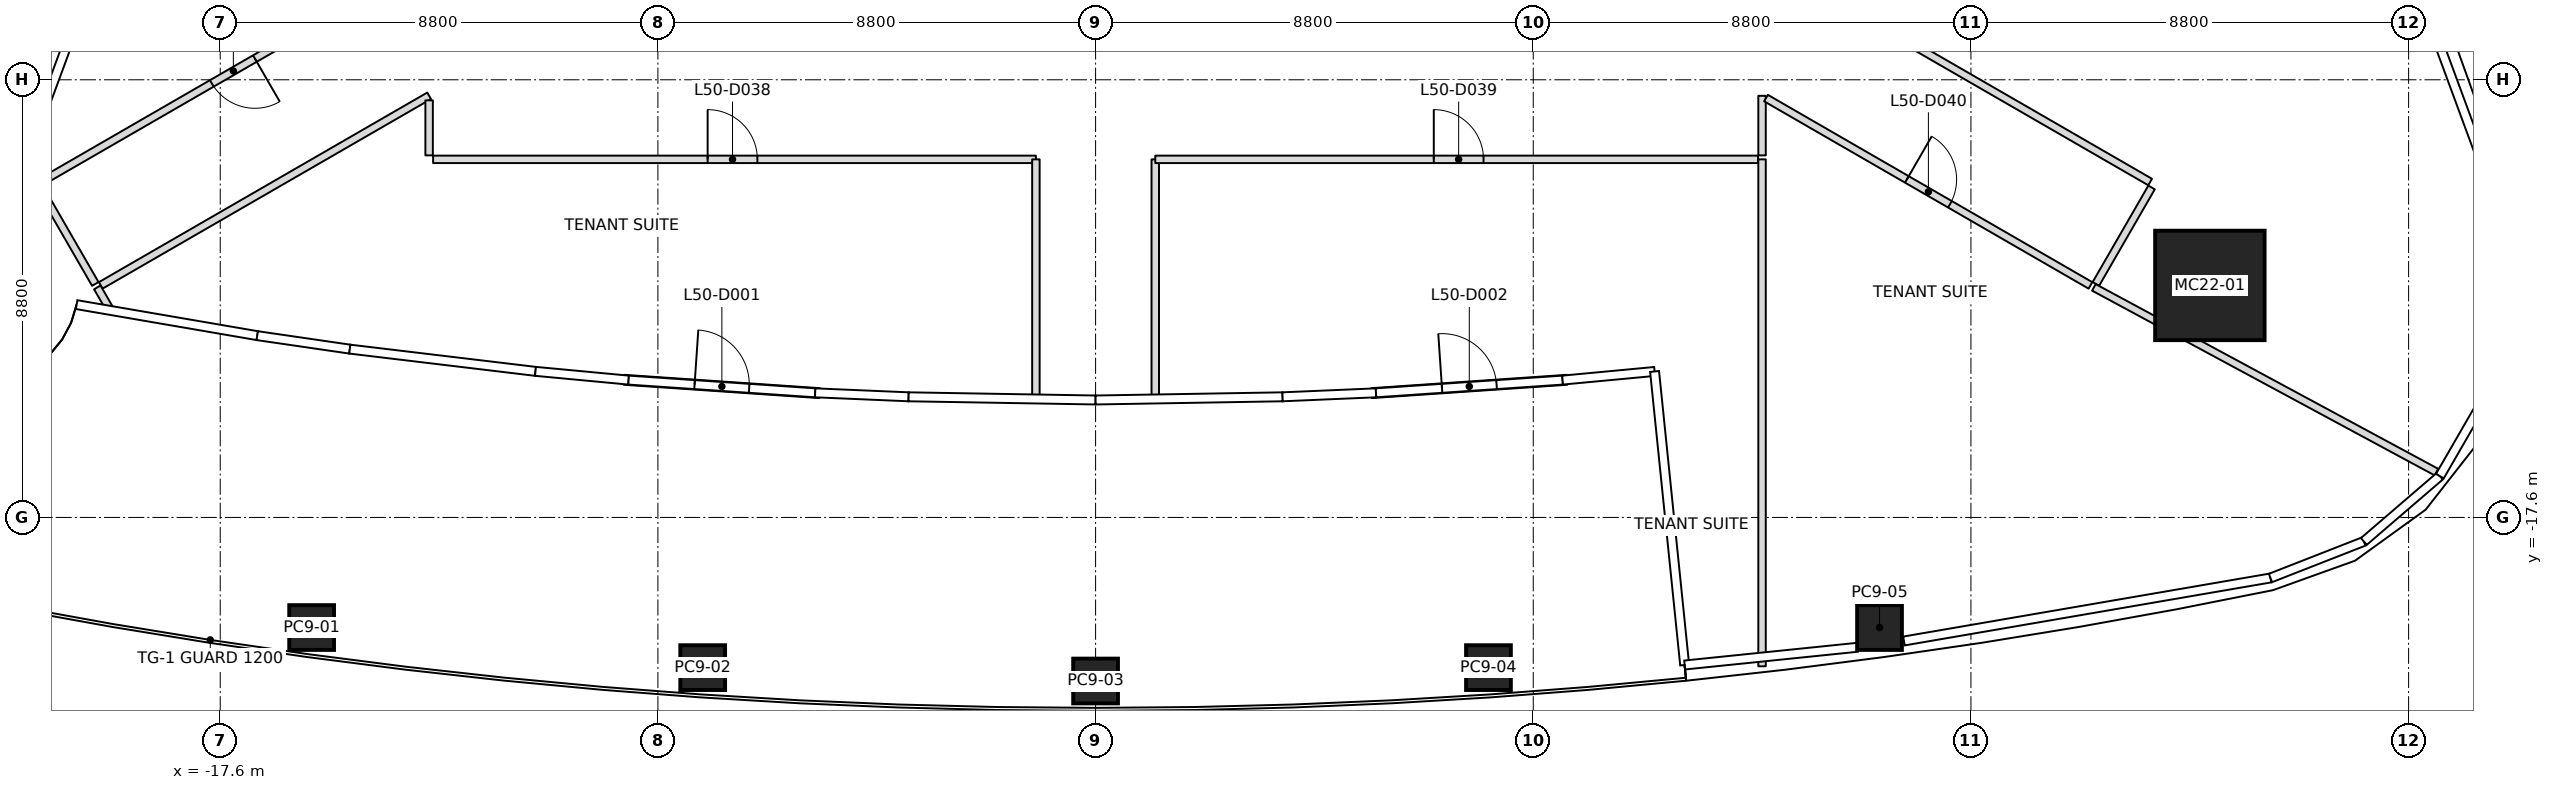
"""IFC4 building model, lengths in metres.
Left out: names, types, materials, properties, quantities, classifications, styles, units other than length and angle.
Written with IfcOpenShell. Run it as: python <this file> out.ifc"""

import sys

from ifc_helpers import new_model, si_unit, direction, frame, frame_2d, origin, origin_2d, place, context, subcontext, project, spatial, rectangle, extrude, clip, halfspace, element, fill, save


model = new_model("IFC4")
c1 = context("Model", 3, precision=1e-05, world=origin(), true_north=direction((0.0, 1.0)))
c2 = subcontext(c1, "Body", "Model", "MODEL_VIEW")
j1 = project(units=[si_unit("LENGTHUNIT", "METRE"), si_unit("PLANEANGLEUNIT", "RADIAN")], contexts=[c1])
p1 = place(None, origin())
s1 = spatial("IfcSite", under=j1, at=p1, CompositionType="ELEMENT")
p2 = place(p1, origin())
s2 = spatial("IfcBuilding", under=s1, at=p2, CompositionType="ELEMENT")
p3 = place(p2, frame((0.0, 0.0, 227.0)))
s3 = spatial("IfcBuildingStorey", under=s2, at=p3, CompositionType="ELEMENT", Elevation=227.0)
p4 = place(p3, frame((22.404, -12.935, 0.0), z_axis=(-0.027878605886, 0.016104927689, 0.999481572936), x_axis=(0.999611316129, 0.000449157512, 0.02787498742)))
e1 = element("IfcColumn", 1, at=p4, inside=s3, PredefinedType="COLUMN", context=c2, shape_type="SweptSolid", body=[
    clip(extrude(rectangle(XDim=2.2, YDim=2.2, at=origin_2d()), origin(), (0.0, 0.0, 1.0), 4.002), halfspace(frame((0.0, 0.0, 0.011)), True)),
])
p5 = place(p3, frame((-15.762, -19.814, 0.0), z_axis=(0.017574453011, 0.010434831475, 0.999791104628), x_axis=(-0.990587246612, 0.135945228189, 0.015993804505)))
e2 = element("IfcColumn", 2, at=p5, inside=s3, PredefinedType="COLUMN", context=c2, shape_type="SweptSolid", body=[
    clip(extrude(rectangle(XDim=0.9, YDim=0.9, at=origin_2d()), origin(), (0.0, 0.0, 1.0), 4.001), halfspace(frame((0.0, 0.0, 0.003)), True)),
])
p6 = place(p3, frame((-7.899, -20.619, 0.0), z_axis=(0.008788174922, 0.01116830563, 0.999899013366), x_axis=(-0.997643851846, 0.068136832565, 0.00800730434)))
e3 = element("IfcColumn", 3, at=p6, inside=s3, PredefinedType="COLUMN", context=c2, shape_type="SweptSolid", body=[
    clip(extrude(rectangle(XDim=0.9, YDim=0.9, at=origin_2d()), origin(), (0.0, 0.0, 1.0), 4.0), halfspace(frame((0.0, 0.0, 0.002)), True)),
])
p7 = place(p3, frame((0.0, -20.889, 0.0), z_axis=(0.0, 0.01141283087, 0.999934871525), x_axis=(1.0, 0.0, 0.0)))
e4 = element("IfcColumn", 4, at=p7, inside=s3, PredefinedType="COLUMN", context=c2, shape_type="SweptSolid", body=[
    clip(extrude(rectangle(XDim=0.9, YDim=0.9, at=origin_2d()), origin(), (0.0, 0.0, 1.0), 4.0), halfspace(frame((0.0, 0.0, 0.001)), True)),
])
p8 = place(p3, frame((7.899, -20.619, 0.0), z_axis=(-0.008788174922, 0.01116830563, 0.999899013366), x_axis=(0.997643851846, 0.068136832565, 0.00800730434)))
e5 = element("IfcColumn", 5, at=p8, inside=s3, PredefinedType="COLUMN", context=c2, shape_type="SweptSolid", body=[
    clip(extrude(rectangle(XDim=0.9, YDim=0.9, at=origin_2d()), origin(), (0.0, 0.0, 1.0), 4.0), halfspace(frame((0.0, 0.0, 0.002)), True)),
])
p9 = place(p3, frame((15.762, -19.814, 0.0), z_axis=(-0.017574453011, 0.010434831475, 0.999791104628), x_axis=(0.990587246612, 0.135945228189, 0.015993804505)))
e6 = element("IfcColumn", 6, at=p9, inside=s3, PredefinedType="COLUMN", context=c2, shape_type="SweptSolid", body=[
    clip(extrude(rectangle(XDim=0.9, YDim=0.9, at=origin_2d()), origin(), (0.0, 0.0, 1.0), 4.001), halfspace(frame((0.0, 0.0, 0.003)), True)),
])
p10 = place(p3, frame((-9.479, -14.832, 0.0), z_axis=(0.0, 0.0, 1.0), x_axis=(0.997678624497, -0.068098180754, 0.0)))
e7 = element("IfcWall", 7, at=p10, inside=s3, PredefinedType="SOLIDWALL", context=c2, shape_type="SweptSolid", body=[
    extrude(rectangle(XDim=3.94, YDim=0.2, at=frame_2d((1.97, 0.0))), origin(), (0.0, 0.0, 1.0), 3.34),
])
p11 = place(p10, frame((1.42, 0.0, 0.0)))
e8 = element("IfcOpeningElement", 8, at=p11, cuts=e7, PredefinedType="OPENING", context=c2, shape_type="SweptSolid", body=[
    extrude(rectangle(XDim=1.1, YDim=2.1, at=frame_2d((0.55, 1.05))), frame((0.0, 0.1, 0.0), z_axis=(0.0, -1.0, 0.0), x_axis=(1.0, 0.0, 0.0)), (0.0, 0.0, 1.0), 0.2),
])
p12 = place(p3, frame((5.548, -15.101, 0.0), z_axis=(0.0, 0.0, 1.0), x_axis=(0.997678624497, 0.068098180754, 0.0)))
e9 = element("IfcWall", 9, at=p12, inside=s3, PredefinedType="SOLIDWALL", context=c2, shape_type="SweptSolid", body=[
    extrude(rectangle(XDim=3.94, YDim=0.2, at=frame_2d((1.97, 0.0))), origin(), (0.0, 0.0, 1.0), 3.34),
])
p13 = place(p12, frame((1.42, 0.0, 0.0)))
e10 = element("IfcOpeningElement", 10, at=p13, cuts=e9, PredefinedType="OPENING", context=c2, shape_type="SweptSolid", body=[
    extrude(rectangle(XDim=1.1, YDim=2.1, at=frame_2d((0.55, 1.05))), frame((0.0, 0.1, 0.0), z_axis=(0.0, -1.0, 0.0), x_axis=(1.0, 0.0, 0.0)), (0.0, 0.0, 1.0), 0.2),
])
p14 = place(p3, frame((-20.072, -12.974, 0.0), z_axis=(0.0, 0.0, 1.0), x_axis=(0.499761325023, -0.866163159002, 0.0)))
e11 = element("IfcWall", 11, at=p14, inside=s3, PredefinedType="PARTITIONING", context=c2, shape_type="SweptSolid", body=[
    extrude(rectangle(XDim=0.544, YDim=0.15, at=frame_2d((0.272, 0.0))), origin(), (0.0, 0.0, 1.0), 3.45),
])
p15 = place(p3, frame((13.4, -10.4, 0.0), z_axis=(0.0, 0.0, 1.0), x_axis=(0.0, -1.0, 0.0)))
e12 = element("IfcWall", 12, at=p15, inside=s3, PredefinedType="PARTITIONING", context=c2, shape_type="SweptSolid", body=[
    extrude(rectangle(XDim=10.193, YDim=0.15, at=frame_2d((5.096, 0.0))), origin(), (0.0, 0.0, 1.0), 3.234),
])
p16 = place(p3, frame((20.072, -12.974, 0.0), z_axis=(0.0, 0.0, 1.0), x_axis=(0.880159358653, -0.474678315678, 0.0)))
e13 = element("IfcWall", 13, at=p16, inside=s3, PredefinedType="PARTITIONING", context=c2, shape_type="SweptSolid", body=[
    extrude(rectangle(XDim=7.825, YDim=0.15, at=frame_2d((3.913, 0.0))), origin(), (0.0, 0.0, 1.0), 3.234),
])
p17 = place(p3, frame((-21.232, -10.965, 0.0), z_axis=(0.0, 0.0, 1.0), x_axis=(0.49994888933, -0.866054910533, 0.0)))
e14 = element("IfcWall", 14, at=p17, inside=s3, PredefinedType="PARTITIONING", context=c2, shape_type="SweptSolid", body=[
    extrude(rectangle(XDim=2.24, YDim=0.15, at=frame_2d((1.12, 0.0))), origin(), (0.0, 0.0, 1.0), 3.233),
])
p18 = place(p3, frame((-13.4, -6.351, 0.0), z_axis=(0.0, 0.0, 1.0), x_axis=(-0.866033522472, -0.499985937757, 0.0)))
e15 = element("IfcWall", 15, at=p18, inside=s3, PredefinedType="PARTITIONING", context=c2, shape_type="SweptSolid", body=[
    extrude(rectangle(XDim=9.01, YDim=0.15, at=frame_2d((4.505, 0.0))), origin(), (0.0, 0.0, 1.0), 3.317),
])
p19 = place(p18, frame((4.045, 0.0, 0.0)))
e16 = element("IfcOpeningElement", 16, at=p19, cuts=e15, PredefinedType="OPENING", context=c2, shape_type="SweptSolid", body=[
    extrude(rectangle(XDim=1.0, YDim=2.1, at=frame_2d((0.5, 1.05))), frame((0.0, 0.075, 0.0), z_axis=(0.0, -1.0, 0.0), x_axis=(1.0, 0.0, 0.0)), (0.0, 0.0, 1.0), 0.15),
])
p20 = place(p3, frame((-20.003, -12.934, 0.0), z_axis=(0.0, 0.0, 1.0), x_axis=(0.866031477394, 0.499989480053, 0.0)))
e17 = element("IfcWall", 17, at=p20, inside=s3, PredefinedType="PARTITIONING", context=c2, shape_type="SweptSolid", body=[
    extrude(rectangle(XDim=7.624, YDim=0.15, at=frame_2d((3.812, 0.0))), origin(), (0.0, 0.0, 1.0), 3.233),
])
p21 = place(p3, frame((-13.4, -9.214, 0.0), z_axis=(0.0, 0.0, 1.0), x_axis=(0.0, -1.0, 0.0)))
e18 = element("IfcWall", 18, at=p21, inside=s3, PredefinedType="PARTITIONING", context=c2, shape_type="SweptSolid", body=[
    extrude(rectangle(XDim=1.106, YDim=0.15, at=frame_2d((0.553, 0.0))), origin(), (0.0, 0.0, 1.0), 3.233),
])
p22 = place(p3, frame((-13.32, -10.4, 0.0), z_axis=(0.0, 0.0, 1.0), x_axis=(1.0, 0.0, 0.0)))
e19 = element("IfcWall", 19, at=p22, inside=s3, PredefinedType="PARTITIONING", context=c2, shape_type="SweptSolid", body=[
    extrude(rectangle(XDim=12.12, YDim=0.15, at=frame_2d((6.06, 0.0))), origin(), (0.0, 0.0, 1.0), 3.317),
])
p23 = place(p22, frame((5.52, 0.0, 0.0)))
e20 = element("IfcOpeningElement", 20, at=p23, cuts=e19, PredefinedType="OPENING", context=c2, shape_type="SweptSolid", body=[
    extrude(rectangle(XDim=1.0, YDim=2.1, at=frame_2d((0.5, 1.05))), frame((0.0, 0.075, 0.0), z_axis=(0.0, -1.0, 0.0), x_axis=(1.0, 0.0, 0.0)), (0.0, 0.0, 1.0), 0.15),
])
for number, where, z_axis, x_axis in (
    (21, (-1.2, -10.4, 0.0), (0.0, 0.0, 1.0), (0.0, -1.0, 0.0)),
    (22, (1.2, -15.228, 0.0), (0.0, 0.0, 1.0), (0.0, 1.0, 0.0)),
):
    element("IfcWall", number, at=place(p3, frame(where, z_axis=z_axis, x_axis=x_axis)), inside=s3, PredefinedType="PARTITIONING", context=c2, shape_type="SweptSolid", body=[
        extrude(rectangle(XDim=4.828, YDim=0.15, at=frame_2d((2.414, 0.0))), origin(), (0.0, 0.0, 1.0), 3.45),
    ])
p24 = place(p3, frame((1.2, -10.4, 0.0), z_axis=(0.0, 0.0, 1.0), x_axis=(1.0, 0.0, 0.0)))
e23 = element("IfcWall", 23, at=p24, inside=s3, PredefinedType="PARTITIONING", context=c2, shape_type="SweptSolid", body=[
    extrude(rectangle(XDim=12.12, YDim=0.15, at=frame_2d((6.06, 0.0))), origin(), (0.0, 0.0, 1.0), 3.317),
])
p25 = place(p24, frame((5.6, 0.0, 0.0)))
e24 = element("IfcOpeningElement", 24, at=p25, cuts=e23, PredefinedType="OPENING", context=c2, shape_type="SweptSolid", body=[
    extrude(rectangle(XDim=1.0, YDim=2.1, at=frame_2d((0.5, 1.05))), frame((0.0, 0.075, 0.0), z_axis=(0.0, -1.0, 0.0), x_axis=(1.0, 0.0, 0.0)), (0.0, 0.0, 1.0), 0.15),
])
p26 = place(p3, frame((13.4, -10.32, 0.0), z_axis=(0.0, 0.0, 1.0), x_axis=(0.0, 1.0, 0.0)))
e25 = element("IfcWall", 25, at=p26, inside=s3, PredefinedType="PARTITIONING", context=c2, shape_type="SweptSolid", body=[
    extrude(rectangle(XDim=1.198, YDim=0.15, at=frame_2d((0.599, 0.0))), origin(), (0.0, 0.0, 1.0), 3.233),
])
p27 = place(p3, frame((13.479, -9.168, 0.0), z_axis=(0.0, 0.0, 1.0), x_axis=(0.866036619927, -0.499980572567, 0.0)))
e26 = element("IfcWall", 26, at=p27, inside=s3, PredefinedType="PARTITIONING", context=c2, shape_type="SweptSolid", body=[
    extrude(rectangle(XDim=7.532, YDim=0.15, at=frame_2d((3.766, 0.0))), origin(), (0.0, 0.0, 1.0), 3.233),
])
p28 = place(p27, frame((3.271, 0.0, 0.0)))
e27 = element("IfcOpeningElement", 27, at=p28, cuts=e26, PredefinedType="OPENING", context=c2, shape_type="SweptSolid", body=[
    extrude(rectangle(XDim=1.0, YDim=2.1, at=frame_2d((0.5, 1.05))), frame((0.0, 0.075, 0.0), z_axis=(0.0, -1.0, 0.0), x_axis=(1.0, 0.0, 0.0)), (0.0, 0.0, 1.0), 0.15),
])
p29 = place(p3, frame((21.203, -10.856, 0.0), z_axis=(0.0, 0.0, 1.0), x_axis=(-0.866033522472, 0.499985937757, 0.0)))
e28 = element("IfcWall", 28, at=p29, inside=s3, PredefinedType="PARTITIONING", context=c2, shape_type="SweptSolid", body=[
    extrude(rectangle(XDim=9.01, YDim=0.15, at=frame_2d((4.505, 0.0))), origin(), (0.0, 0.0, 1.0), 3.317),
])
p30 = place(p3, frame((20.112, -12.905, 0.0), z_axis=(0.0, 0.0, 1.0), x_axis=(0.49994888933, 0.866054910533, 0.0)))
e29 = element("IfcWall", 29, at=p30, inside=s3, PredefinedType="PARTITIONING", context=c2, shape_type="SweptSolid", body=[
    extrude(rectangle(XDim=2.24, YDim=0.15, at=frame_2d((1.12, 0.0))), origin(), (0.0, 0.0, 1.0), 3.233),
])
p31 = place(p11, origin())
e30 = element("IfcDoor", 30, at=p31, inside=s3, OperationType="SINGLE_SWING_LEFT", PredefinedType="DOOR", context=c2, shape_type="SweptSolid", body=[
    extrude(rectangle(XDim=1.1, YDim=2.1, at=frame_2d((0.55, 1.05))), frame((0.0, 0.025, 0.0), z_axis=(0.0, -1.0, 0.0), x_axis=(1.0, 0.0, 0.0)), (0.0, 0.0, 1.0), 0.05),
])
fill(e8, e30)
p32 = place(p13, origin())
e31 = element("IfcDoor", 31, at=p32, inside=s3, OperationType="SINGLE_SWING_LEFT", PredefinedType="DOOR", context=c2, shape_type="SweptSolid", body=[
    extrude(rectangle(XDim=1.1, YDim=2.1, at=frame_2d((0.55, 1.05))), frame((0.0, 0.025, 0.0), z_axis=(0.0, -1.0, 0.0), x_axis=(1.0, 0.0, 0.0)), (0.0, 0.0, 1.0), 0.05),
])
fill(e10, e31)
p33 = place(p19, origin())
e32 = element("IfcDoor", 32, at=p33, inside=s3, OperationType="SINGLE_SWING_LEFT", PredefinedType="DOOR", context=c2, shape_type="SweptSolid", body=[
    extrude(rectangle(XDim=1.0, YDim=2.1, at=frame_2d((0.5, 1.05))), frame((0.0, 0.025, 0.0), z_axis=(0.0, -1.0, 0.0), x_axis=(1.0, 0.0, 0.0)), (0.0, 0.0, 1.0), 0.05),
])
fill(e16, e32)
p34 = place(p23, origin())
e33 = element("IfcDoor", 33, at=p34, inside=s3, OperationType="SINGLE_SWING_LEFT", PredefinedType="DOOR", context=c2, shape_type="SweptSolid", body=[
    extrude(rectangle(XDim=1.0, YDim=2.1, at=frame_2d((0.5, 1.05))), frame((0.0, 0.025, 0.0), z_axis=(0.0, -1.0, 0.0), x_axis=(1.0, 0.0, 0.0)), (0.0, 0.0, 1.0), 0.05),
])
fill(e20, e33)
p35 = place(p25, origin())
e34 = element("IfcDoor", 34, at=p35, inside=s3, OperationType="SINGLE_SWING_RIGHT", PredefinedType="DOOR", context=c2, shape_type="SweptSolid", body=[
    extrude(rectangle(XDim=1.0, YDim=2.1, at=frame_2d((0.5, 1.05))), frame((0.0, 0.025, 0.0), z_axis=(0.0, -1.0, 0.0), x_axis=(1.0, 0.0, 0.0)), (0.0, 0.0, 1.0), 0.05),
])
fill(e24, e34)
p36 = place(p28, origin())
e35 = element("IfcDoor", 35, at=p36, inside=s3, OperationType="SINGLE_SWING_RIGHT", PredefinedType="DOOR", context=c2, shape_type="SweptSolid", body=[
    extrude(rectangle(XDim=1.0, YDim=2.1, at=frame_2d((0.5, 1.05))), frame((0.0, 0.025, 0.0), z_axis=(0.0, -1.0, 0.0), x_axis=(1.0, 0.0, 0.0)), (0.0, 0.0, 1.0), 0.05),
])
fill(e27, e35)
save(model, sys.argv[1])
